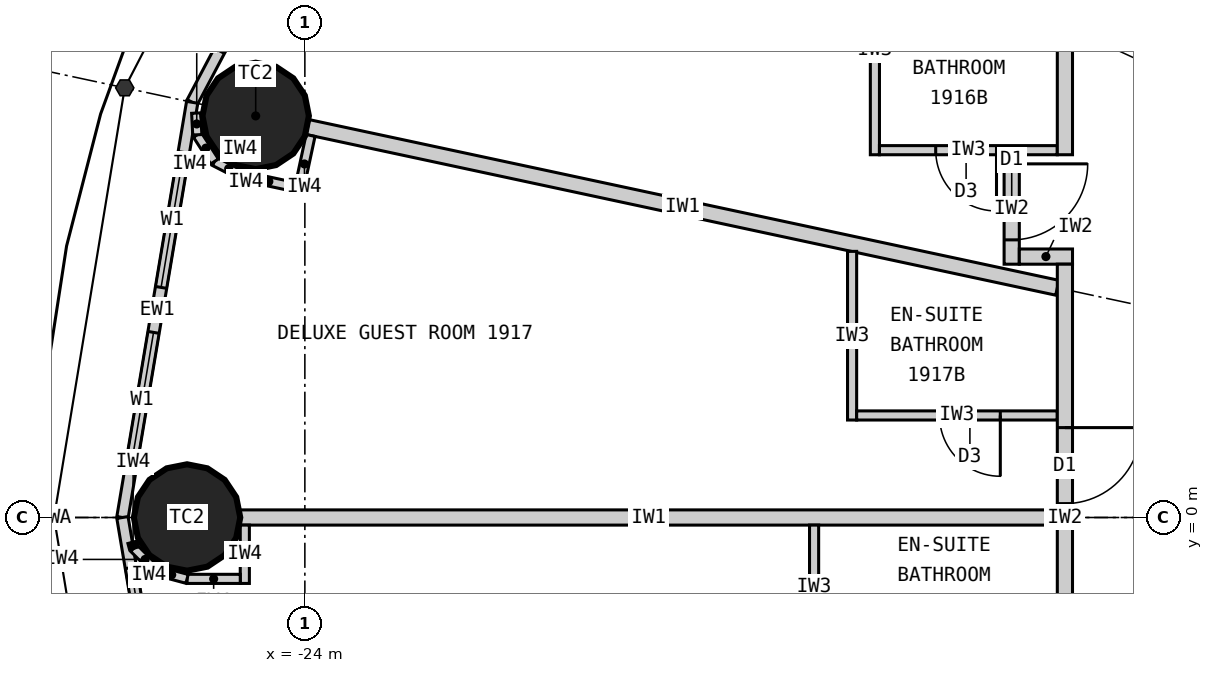
"""IFC4 building model, lengths in metres.
Left out: names, types, materials, properties, quantities, classifications, styles, units other than length and angle.
Written with IfcOpenShell. Run it as: python <this file> out.ifc"""

import sys

from ifc_helpers import new_model, si_unit, direction, frame, frame_2d, origin, origin_2d, place, context, subcontext, project, spatial, rectangle, circle, extrude, element, fill, save


model = new_model("IFC4")
c1 = context("Model", 3, precision=1e-05, world=origin(), true_north=direction((0.0, 1.0)))
c2 = subcontext(c1, "Body", "Model", "MODEL_VIEW")
j1 = project(units=[si_unit("LENGTHUNIT", "METRE"), si_unit("PLANEANGLEUNIT", "RADIAN")], contexts=[c1])
p1 = place(None, origin())
s1 = spatial("IfcSite", under=j1, at=p1, CompositionType="ELEMENT")
p2 = place(p1, origin())
s2 = spatial("IfcBuilding", under=s1, at=p2, CompositionType="ELEMENT")
p3 = place(p2, frame((0.0, 0.0, 77.1)))
s3 = spatial("IfcBuildingStorey", under=s2, at=p3, CompositionType="ELEMENT", Elevation=77.1)
for number, where, z_axis, x_axis in (
    (1, (-24.647, 5.283, 0.0), (0.0, 0.0, 1.0), (1.0, 0.0, 0.0)),
    (2, (-25.55, 0.0, 0.0), (0.0, 0.0, 1.0), (1.0, 0.0, 0.0)),
):
    element("IfcColumn", number, at=place(p3, frame(where, z_axis=z_axis, x_axis=x_axis)), inside=s3, PredefinedType="COLUMN", context=c2, shape_type="SweptSolid", body=[
        extrude(circle(Radius=0.7, at=origin_2d()), origin(), (0.0, 0.0, 1.0), 3.3),
    ])
p4 = place(p3, frame((-22.803, 10.532, 0.0), z_axis=(0.0, 0.0, 1.0), x_axis=(-0.467296867008, -0.884100468321, 0.0)))
e3 = element("IfcWall", 3, at=p4, inside=s3, PredefinedType="ELEMENTEDWALL", context=c2, shape_type="SweptSolid", body=[
    extrude(rectangle(XDim=5.734, YDim=0.15, at=frame_2d((2.867, 0.0))), origin(), (0.0, 0.0, 1.0), 3.12),
])
p5 = place(p4, frame((0.767, 0.0, 0.9)))
e4 = element("IfcOpeningElement", 4, at=p5, cuts=e3, PredefinedType="OPENING", context=c2, shape_type="SweptSolid", body=[
    extrude(rectangle(XDim=1.8, YDim=1.9, at=frame_2d((0.9, 0.95))), frame((0.0, 0.085, 0.0), z_axis=(0.0, -1.0, 0.0), x_axis=(1.0, 0.0, 0.0)), (0.0, 0.0, 1.0), 0.17),
])
p6 = place(p4, frame((3.167, 0.0, 0.9)))
e5 = element("IfcOpeningElement", 5, at=p6, cuts=e3, PredefinedType="OPENING", context=c2, shape_type="SweptSolid", body=[
    extrude(rectangle(XDim=1.8, YDim=1.9, at=frame_2d((0.9, 0.95))), frame((0.0, 0.085, 0.0), z_axis=(0.0, -1.0, 0.0), x_axis=(1.0, 0.0, 0.0)), (0.0, 0.0, 1.0), 0.17),
])
p7 = place(p3, frame((-25.482, 5.462, 0.0), z_axis=(0.0, 0.0, 1.0), x_axis=(-0.165642551694, -0.986185857264, 0.0)))
e6 = element("IfcWall", 6, at=p7, inside=s3, PredefinedType="ELEMENTEDWALL", context=c2, shape_type="SweptSolid", body=[
    extrude(rectangle(XDim=5.539, YDim=0.15, at=frame_2d((2.77, 0.0))), origin(), (0.0, 0.0, 1.0), 3.12),
])
p8 = place(p7, frame((0.669, 0.0, 0.9)))
e7 = element("IfcOpeningElement", 7, at=p8, cuts=e6, PredefinedType="OPENING", context=c2, shape_type="SweptSolid", body=[
    extrude(rectangle(XDim=1.8, YDim=1.9, at=frame_2d((0.9, 0.95))), frame((0.0, 0.085, 0.0), z_axis=(0.0, -1.0, 0.0), x_axis=(1.0, 0.0, 0.0)), (0.0, 0.0, 1.0), 0.17),
])
p9 = place(p7, frame((3.07, 0.0, 0.9)))
e8 = element("IfcOpeningElement", 8, at=p9, cuts=e6, PredefinedType="OPENING", context=c2, shape_type="SweptSolid", body=[
    extrude(rectangle(XDim=1.8, YDim=1.9, at=frame_2d((0.9, 0.95))), frame((0.0, 0.085, 0.0), z_axis=(0.0, -1.0, 0.0), x_axis=(1.0, 0.0, 0.0)), (0.0, 0.0, 1.0), 0.17),
])
p10 = place(p3, frame((-26.4, 0.0, 0.0), z_axis=(0.0, 0.0, 1.0), x_axis=(0.165642551694, -0.986185857264, 0.0)))
e9 = element("IfcWall", 9, at=p10, inside=s3, PredefinedType="ELEMENTEDWALL", context=c2, shape_type="SweptSolid", body=[
    extrude(rectangle(XDim=5.539, YDim=0.15, at=frame_2d((2.77, 0.0))), origin(), (0.0, 0.0, 1.0), 3.12),
])
p11 = place(p10, frame((0.669, 0.0, 0.9)))
e10 = element("IfcOpeningElement", 10, at=p11, cuts=e9, PredefinedType="OPENING", context=c2, shape_type="SweptSolid", body=[
    extrude(rectangle(XDim=1.8, YDim=1.9, at=frame_2d((0.9, 0.95))), frame((0.0, 0.085, 0.0), z_axis=(0.0, -1.0, 0.0), x_axis=(1.0, 0.0, 0.0)), (0.0, 0.0, 1.0), 0.17),
])
p12 = place(p10, frame((3.07, 0.0, 0.9)))
e11 = element("IfcOpeningElement", 11, at=p12, cuts=e9, PredefinedType="OPENING", context=c2, shape_type="SweptSolid", body=[
    extrude(rectangle(XDim=1.8, YDim=1.9, at=frame_2d((0.9, 0.95))), frame((0.0, 0.085, 0.0), z_axis=(0.0, -1.0, 0.0), x_axis=(1.0, 0.0, 0.0)), (0.0, 0.0, 1.0), 0.17),
])
p13 = place(p3, frame((-14.1, 3.022, 0.0), z_axis=(0.0, 0.0, 1.0), x_axis=(-0.977790014929, 0.209586943072, 0.0)))
e12 = element("IfcWall", 12, at=p13, inside=s3, PredefinedType="PARTITIONING", context=c2, shape_type="SweptSolid", body=[
    extrude(rectangle(XDim=10.087, YDim=0.2, at=frame_2d((5.043, 0.0))), origin(), (0.0, 0.0, 1.0), 2.32),
])
p14 = place(p3, frame((-14.1, 0.0, 0.0), z_axis=(0.0, 0.0, 1.0), x_axis=(-1.0, 0.0, 0.0)))
e13 = element("IfcWall", 13, at=p14, inside=s3, PredefinedType="PARTITIONING", context=c2, shape_type="SweptSolid", body=[
    extrude(rectangle(XDim=10.75, YDim=0.2, at=frame_2d((5.375, 0.0))), origin(), (0.0, 0.0, 1.0), 2.27),
])
p15 = place(p3, frame((-16.5, 7.521, 0.0), z_axis=(0.0, 0.0, 1.0), x_axis=(0.0, -1.0, 0.0)))
e14 = element("IfcWall", 14, at=p15, inside=s3, PredefinedType="PARTITIONING", context=c2, shape_type="SweptSolid", body=[
    extrude(rectangle(XDim=2.749, YDim=0.12, at=frame_2d((1.374, 0.0))), origin(), (0.0, 0.0, 1.0), 3.12),
])
p16 = place(p3, frame((-14.1, 4.833, 0.0), z_axis=(0.0, 0.0, 1.0), x_axis=(-1.0, 0.0, 0.0)))
e15 = element("IfcWall", 15, at=p16, inside=s3, PredefinedType="PARTITIONING", context=c2, shape_type="SweptSolid", body=[
    extrude(rectangle(XDim=2.34, YDim=0.12, at=frame_2d((1.17, 0.0))), origin(), (0.0, 0.0, 1.0), 3.12),
])
p17 = place(p16, frame((0.8, 0.0, 0.0)))
e16 = element("IfcOpeningElement", 16, at=p17, cuts=e15, PredefinedType="OPENING", context=c2, shape_type="SweptSolid", body=[
    extrude(rectangle(XDim=0.8, YDim=2.1, at=frame_2d((0.4, 1.05))), frame((0.0, 0.07, 0.0), z_axis=(0.0, -1.0, 0.0), x_axis=(1.0, 0.0, 0.0)), (0.0, 0.0, 1.0), 0.14),
])
p18 = place(p3, frame((-16.8, 3.501, 0.0), z_axis=(0.0, 0.0, 1.0), x_axis=(0.0, -1.0, 0.0)))
e17 = element("IfcWall", 17, at=p18, inside=s3, PredefinedType="PARTITIONING", context=c2, shape_type="SweptSolid", body=[
    extrude(rectangle(XDim=2.219, YDim=0.12, at=frame_2d((1.109, 0.0))), origin(), (0.0, 0.0, 1.0), 3.12),
])
p19 = place(p3, frame((-14.1, 1.343, 0.0), z_axis=(0.0, 0.0, 1.0), x_axis=(-1.0, 0.0, 0.0)))
e18 = element("IfcWall", 18, at=p19, inside=s3, PredefinedType="PARTITIONING", context=c2, shape_type="SweptSolid", body=[
    extrude(rectangle(XDim=2.64, YDim=0.12, at=frame_2d((1.32, 0.0))), origin(), (0.0, 0.0, 1.0), 3.12),
])
p20 = place(p19, frame((0.75, 0.0, 0.0)))
e19 = element("IfcOpeningElement", 19, at=p20, cuts=e18, PredefinedType="OPENING", context=c2, shape_type="SweptSolid", body=[
    extrude(rectangle(XDim=0.8, YDim=2.1, at=frame_2d((0.4, 1.05))), frame((0.0, 0.07, 0.0), z_axis=(0.0, -1.0, 0.0), x_axis=(1.0, 0.0, 0.0)), (0.0, 0.0, 1.0), 0.14),
])
p21 = place(p3, frame((-17.3, -0.1, 0.0), z_axis=(0.0, 0.0, 1.0), x_axis=(0.0, -1.0, 0.0)))
e20 = element("IfcWall", 20, at=p21, inside=s3, PredefinedType="PARTITIONING", context=c2, shape_type="SweptSolid", body=[
    extrude(rectangle(XDim=1.64, YDim=0.12, at=frame_2d((0.82, 0.0))), origin(), (0.0, 0.0, 1.0), 3.12),
])
p22 = place(p3, frame((-14.7, 4.772, 0.0), z_axis=(0.0, 0.0, 1.0), x_axis=(0.0, -1.0, 0.0)))
e21 = element("IfcWall", 21, at=p22, inside=s3, PredefinedType="PARTITIONING", context=c2, shape_type="SweptSolid", body=[
    extrude(rectangle(XDim=1.44, YDim=0.2, at=frame_2d((0.72, 0.0))), origin(), (0.0, 0.0, 1.0), 3.12),
])
p23 = place(p22, frame((0.12, 0.0, 0.0)))
e22 = element("IfcOpeningElement", 22, at=p23, cuts=e21, PredefinedType="OPENING", context=c2, shape_type="SweptSolid", body=[
    extrude(rectangle(XDim=1.0, YDim=2.2, at=frame_2d((0.5, 1.1))), frame((0.0, 0.11, 0.0), z_axis=(0.0, -1.0, 0.0), x_axis=(1.0, 0.0, 0.0)), (0.0, 0.0, 1.0), 0.22),
])
p24 = place(p3, frame((-13.9, 3.433, 0.0), z_axis=(0.0, 0.0, 1.0), x_axis=(-1.0, 0.0, 0.0)))
e23 = element("IfcWall", 23, at=p24, inside=s3, PredefinedType="PARTITIONING", context=c2, shape_type="SweptSolid", body=[
    extrude(rectangle(XDim=0.7, YDim=0.2, at=frame_2d((0.35, 0.0))), origin(), (0.0, 0.0, 1.0), 2.32),
])
p25 = place(p3, frame((-14.0, 9.9, 0.0), z_axis=(0.0, 0.0, 1.0), x_axis=(0.0, -1.0, 0.0)))
e24 = element("IfcWall", 24, at=p25, inside=s3, PredefinedType="PARTITIONING", context=c2, shape_type="SweptSolid", body=[
    extrude(rectangle(XDim=5.127, YDim=0.2, at=frame_2d((2.564, 0.0))), origin(), (0.0, 0.0, 1.0), 3.12),
])
p26 = place(p25, frame((0.103, 0.0, 0.0)))
e25 = element("IfcOpeningElement", 25, at=p26, cuts=e24, PredefinedType="OPENING", context=c2, shape_type="SweptSolid", body=[
    extrude(rectangle(XDim=1.0, YDim=2.2, at=frame_2d((0.5, 1.1))), frame((0.0, 0.11, 0.0), z_axis=(0.0, -1.0, 0.0), x_axis=(1.0, 0.0, 0.0)), (0.0, 0.0, 1.0), 0.22),
])
p27 = place(p3, frame((-14.0, 3.333, 0.0), z_axis=(0.0, 0.0, 1.0), x_axis=(0.0, -1.0, 0.0)))
e26 = element("IfcWall", 26, at=p27, inside=s3, PredefinedType="PARTITIONING", context=c2, shape_type="SweptSolid", body=[
    extrude(rectangle(XDim=6.665, YDim=0.2, at=frame_2d((3.333, 0.0))), origin(), (0.0, 0.0, 1.0), 3.12),
])
p28 = place(p27, frame((2.15, 0.0, 0.0)))
e27 = element("IfcOpeningElement", 27, at=p28, cuts=e26, PredefinedType="OPENING", context=c2, shape_type="SweptSolid", body=[
    extrude(rectangle(XDim=1.0, YDim=2.2, at=frame_2d((0.5, 1.1))), frame((0.0, 0.11, 0.0), z_axis=(0.0, -1.0, 0.0), x_axis=(1.0, 0.0, 0.0)), (0.0, 0.0, 1.0), 0.22),
])
p29 = place(p27, frame((5.173, 0.0, 0.0)))
e28 = element("IfcOpeningElement", 28, at=p29, cuts=e26, PredefinedType="OPENING", context=c2, shape_type="SweptSolid", body=[
    extrude(rectangle(XDim=1.0, YDim=2.2, at=frame_2d((0.5, 1.1))), frame((0.0, 0.11, 0.0), z_axis=(0.0, -1.0, 0.0), x_axis=(1.0, 0.0, 0.0)), (0.0, 0.0, 1.0), 0.22),
])
p30 = place(p3, frame((-23.925, 5.026, 0.0), z_axis=(0.0, 0.0, 1.0), x_axis=(-0.209681192172, -0.977769808109, 0.0)))
e29 = element("IfcWall", 29, at=p30, inside=s3, PredefinedType="PARTITIONING", context=c2, shape_type="SweptSolid", body=[
    extrude(rectangle(XDim=0.767, YDim=0.12, at=frame_2d((0.384, 0.0))), origin(), (0.0, 0.0, 1.0), 3.12),
])
p31 = place(p3, frame((-24.132, 4.347, 0.0), z_axis=(0.0, 0.0, 1.0), x_axis=(-0.977776882509, 0.209648200638, 0.0)))
e30 = element("IfcWall", 30, at=p31, inside=s3, PredefinedType="PARTITIONING", context=c2, shape_type="SweptSolid", body=[
    extrude(rectangle(XDim=0.7, YDim=0.12, at=frame_2d((0.35, 0.0))), origin(), (0.0, 0.0, 1.0), 3.12),
])
for number, where, z_axis, x_axis in (
    (31, (-24.816, 4.494, 0.0), (0.0, 0.0, 1.0), (-0.89, 0.455, 0.0)),
    (32, (-25.188, 4.684, 0.0), (0.0, 0.0, 1.0), (-0.543, 0.84, 0.0)),
):
    element("IfcWall", number, at=place(p3, frame(where, z_axis=z_axis, x_axis=x_axis)), inside=s3, PredefinedType="PARTITIONING", context=c2, shape_type="SweptSolid", body=[
        extrude(rectangle(XDim=0.418, YDim=0.12, at=frame_2d((0.209, 0.0))), origin(), (0.0, 0.0, 1.0), 3.12),
    ])
p32 = place(p3, frame((-25.416, 5.035, 0.0), z_axis=(0.0, 0.0, 1.0), x_axis=(-0.050406329159, 0.998728793007, 0.0)))
e33 = element("IfcWall", 33, at=p32, inside=s3, PredefinedType="PARTITIONING", context=c2, shape_type="SweptSolid", body=[
    extrude(rectangle(XDim=0.286, YDim=0.12, at=frame_2d((0.143, 0.0))), origin(), (0.0, 0.0, 1.0), 3.12),
])
p33 = place(p3, frame((-24.79, -0.1, 0.0), z_axis=(0.0, 0.0, 1.0), x_axis=(0.0, -1.0, 0.0)))
e34 = element("IfcWall", 34, at=p33, inside=s3, PredefinedType="PARTITIONING", context=c2, shape_type="SweptSolid", body=[
    extrude(rectangle(XDim=0.767, YDim=0.12, at=frame_2d((0.384, 0.0))), origin(), (0.0, 0.0, 1.0), 3.12),
])
p34 = place(p3, frame((-24.85, -0.808, 0.0), z_axis=(0.0, 0.0, 1.0), x_axis=(-1.0, 0.0, 0.0)))
e35 = element("IfcWall", 35, at=p34, inside=s3, PredefinedType="PARTITIONING", context=c2, shape_type="SweptSolid", body=[
    extrude(rectangle(XDim=0.7, YDim=0.12, at=frame_2d((0.35, 0.0))), origin(), (0.0, 0.0, 1.0), 3.12),
])
p35 = place(p3, frame((-25.55, -0.808, 0.0), z_axis=(0.0, 0.0, 1.0), x_axis=(-0.965807183573, 0.2592614205, 0.0)))
e36 = element("IfcWall", 36, at=p35, inside=s3, PredefinedType="PARTITIONING", context=c2, shape_type="SweptSolid", body=[
    extrude(rectangle(XDim=0.418, YDim=0.12, at=frame_2d((0.209, 0.0))), origin(), (0.0, 0.0, 1.0), 3.12),
])
p36 = place(p3, frame((-25.954, -0.699, 0.0), z_axis=(0.0, 0.0, 1.0), x_axis=(-0.707106781187, 0.707106781187, 0.0)))
e37 = element("IfcWall", 37, at=p36, inside=s3, PredefinedType="PARTITIONING", context=c2, shape_type="SweptSolid", body=[
    extrude(rectangle(XDim=0.418, YDim=0.12, at=frame_2d((0.209, 0.0))), origin(), (0.0, 0.0, 1.0), 3.12),
])
p37 = place(p3, frame((-26.249, -0.404, 0.0), z_axis=(0.0, 0.0, 1.0), x_axis=(-0.259754282609, 0.965674744759, 0.0)))
e38 = element("IfcWall", 38, at=p37, inside=s3, PredefinedType="PARTITIONING", context=c2, shape_type="SweptSolid", body=[
    extrude(rectangle(XDim=0.08, YDim=0.12, at=frame_2d((0.04, 0.0))), origin(), (0.0, 0.0, 1.0), 3.12),
])
p38 = place(p8, origin())
e39 = element("IfcWindow", 39, at=p38, inside=s3, PartitioningType="SINGLE_PANEL", PredefinedType="WINDOW", context=c2, shape_type="SweptSolid", body=[
    extrude(rectangle(XDim=1.8, YDim=1.9, at=frame_2d((0.9, 0.95))), frame((0.0, 0.03, 0.0), z_axis=(0.0, -1.0, 0.0), x_axis=(1.0, 0.0, 0.0)), (0.0, 0.0, 1.0), 0.06),
])
fill(e7, e39)
p39 = place(p9, origin())
e40 = element("IfcWindow", 40, at=p39, inside=s3, PartitioningType="SINGLE_PANEL", PredefinedType="WINDOW", context=c2, shape_type="SweptSolid", body=[
    extrude(rectangle(XDim=1.8, YDim=1.9, at=frame_2d((0.9, 0.95))), frame((0.0, 0.03, 0.0), z_axis=(0.0, -1.0, 0.0), x_axis=(1.0, 0.0, 0.0)), (0.0, 0.0, 1.0), 0.06),
])
fill(e8, e40)
p40 = place(p11, origin())
e41 = element("IfcWindow", 41, at=p40, inside=s3, PartitioningType="SINGLE_PANEL", PredefinedType="WINDOW", context=c2, shape_type="SweptSolid", body=[
    extrude(rectangle(XDim=1.8, YDim=1.9, at=frame_2d((0.9, 0.95))), frame((0.0, 0.03, 0.0), z_axis=(0.0, -1.0, 0.0), x_axis=(1.0, 0.0, 0.0)), (0.0, 0.0, 1.0), 0.06),
])
fill(e10, e41)
p41 = place(p17, origin())
e42 = element("IfcDoor", 42, at=p41, inside=s3, OperationType="SINGLE_SWING_LEFT", PredefinedType="DOOR", context=c2, shape_type="SweptSolid", body=[
    extrude(rectangle(XDim=0.8, YDim=2.1, at=frame_2d((0.4, 1.05))), frame((0.0, 0.025, 0.0), z_axis=(0.0, -1.0, 0.0), x_axis=(1.0, 0.0, 0.0)), (0.0, 0.0, 1.0), 0.05),
])
fill(e16, e42)
p42 = place(p23, origin())
e43 = element("IfcDoor", 43, at=p42, inside=s3, OperationType="SINGLE_SWING_LEFT", PredefinedType="DOOR", context=c2, shape_type="SweptSolid", body=[
    extrude(rectangle(XDim=1.0, YDim=2.2, at=frame_2d((0.5, 1.1))), frame((0.0, 0.025, 0.0), z_axis=(0.0, -1.0, 0.0), x_axis=(1.0, 0.0, 0.0)), (0.0, 0.0, 1.0), 0.05),
])
fill(e22, e43)
p43 = place(p20, origin())
e44 = element("IfcDoor", 44, at=p43, inside=s3, OperationType="SINGLE_SWING_LEFT", PredefinedType="DOOR", context=c2, shape_type="SweptSolid", body=[
    extrude(rectangle(XDim=0.8, YDim=2.1, at=frame_2d((0.4, 1.05))), frame((0.0, 0.025, 0.0), z_axis=(0.0, -1.0, 0.0), x_axis=(1.0, 0.0, 0.0)), (0.0, 0.0, 1.0), 0.05),
])
fill(e19, e44)
p44 = place(p28, origin())
e45 = element("IfcDoor", 45, at=p44, inside=s3, OperationType="SINGLE_SWING_LEFT", PredefinedType="DOOR", context=c2, shape_type="SweptSolid", body=[
    extrude(rectangle(XDim=1.0, YDim=2.2, at=frame_2d((0.5, 1.1))), frame((0.0, 0.025, 0.0), z_axis=(0.0, -1.0, 0.0), x_axis=(1.0, 0.0, 0.0)), (0.0, 0.0, 1.0), 0.05),
])
fill(e27, e45)
save(model, sys.argv[1])
